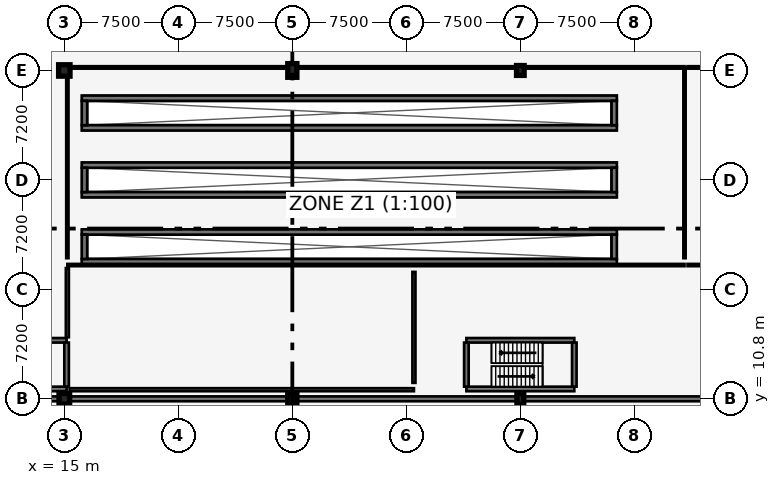
"""IFC4 building model, lengths in metres.
Left out: names, types, materials, properties, quantities, classifications, styles, units other than length and angle.
Written with IfcOpenShell. Run it as: python <this file> out.ifc"""

import sys

from ifc_helpers import new_model, si_unit, direction, frame, frame_2d, origin, origin_2d, place, context, subcontext, project, spatial, rectangle, extrude, element, fill, save


model = new_model("IFC4")
c1 = context("Model", 3, precision=1e-05, world=origin(), true_north=direction((0.0, 1.0)))
c2 = subcontext(c1, "Body", "Model", "MODEL_VIEW")
j1 = project(units=[si_unit("LENGTHUNIT", "METRE"), si_unit("PLANEANGLEUNIT", "RADIAN")], contexts=[c1])
p1 = place(None, origin())
s1 = spatial("IfcSite", under=j1, at=p1, CompositionType="ELEMENT")
p2 = place(p1, origin())
s2 = spatial("IfcBuilding", under=s1, at=p2, CompositionType="ELEMENT")
p3 = place(p2, origin())
s3 = spatial("IfcBuildingStorey", under=s2, at=p3, CompositionType="ELEMENT", Elevation=0.0)
for number, where, z_axis, x_axis in (
    (1, (16.15, 19.825, -1.65), (0.0, 0.0, 1.0), (1.0, 0.0, 0.0)),
    (2, (16.15, 21.775, -1.65), (0.0, 0.0, 1.0), (1.0, 0.0, 0.0)),
):
    element("IfcWall", number, at=place(p3, frame(where, z_axis=z_axis, x_axis=x_axis)), inside=s3, PredefinedType="USERDEFINED", context=c2, shape_type="SweptSolid", body=[
        extrude(rectangle(XDim=35.2, YDim=0.35, at=frame_2d((17.6, 0.0))), origin(), (0.0, 0.0, 1.0), 1.225),
    ])
for number, where, z_axis, x_axis in (
    (3, (16.325, 20.0, -1.65), (0.0, 0.0, 1.0), (0.0, 1.0, 0.0)),
    (4, (51.175, 20.0, -1.65), (0.0, 0.0, 1.0), (0.0, 1.0, 0.0)),
):
    element("IfcWall", number, at=place(p3, frame(where, z_axis=z_axis, x_axis=x_axis)), inside=s3, PredefinedType="USERDEFINED", context=c2, shape_type="SweptSolid", body=[
        extrude(rectangle(XDim=1.6, YDim=0.35, at=frame_2d((0.8, 0.0))), origin(), (0.0, 0.0, 1.0), 1.225),
    ])
for number, where, z_axis, x_axis in (
    (5, (16.15, 24.225, -1.65), (0.0, 0.0, 1.0), (1.0, 0.0, 0.0)),
    (6, (16.15, 26.175, -1.65), (0.0, 0.0, 1.0), (1.0, 0.0, 0.0)),
):
    element("IfcWall", number, at=place(p3, frame(where, z_axis=z_axis, x_axis=x_axis)), inside=s3, PredefinedType="USERDEFINED", context=c2, shape_type="SweptSolid", body=[
        extrude(rectangle(XDim=35.2, YDim=0.35, at=frame_2d((17.6, 0.0))), origin(), (0.0, 0.0, 1.0), 1.225),
    ])
for number, where, z_axis, x_axis in (
    (7, (16.325, 24.4, -1.65), (0.0, 0.0, 1.0), (0.0, 1.0, 0.0)),
    (8, (51.175, 24.4, -1.65), (0.0, 0.0, 1.0), (0.0, 1.0, 0.0)),
):
    element("IfcWall", number, at=place(p3, frame(where, z_axis=z_axis, x_axis=x_axis)), inside=s3, PredefinedType="USERDEFINED", context=c2, shape_type="SweptSolid", body=[
        extrude(rectangle(XDim=1.6, YDim=0.35, at=frame_2d((0.8, 0.0))), origin(), (0.0, 0.0, 1.0), 1.225),
    ])
for number, where, z_axis, x_axis in (
    (9, (16.15, 28.625, -1.65), (0.0, 0.0, 1.0), (1.0, 0.0, 0.0)),
    (10, (16.15, 30.575, -1.65), (0.0, 0.0, 1.0), (1.0, 0.0, 0.0)),
):
    element("IfcWall", number, at=place(p3, frame(where, z_axis=z_axis, x_axis=x_axis)), inside=s3, PredefinedType="USERDEFINED", context=c2, shape_type="SweptSolid", body=[
        extrude(rectangle(XDim=35.2, YDim=0.35, at=frame_2d((17.6, 0.0))), origin(), (0.0, 0.0, 1.0), 1.225),
    ])
for number, where, z_axis, x_axis in (
    (11, (16.325, 28.8, -1.65), (0.0, 0.0, 1.0), (0.0, 1.0, 0.0)),
    (12, (51.175, 28.8, -1.65), (0.0, 0.0, 1.0), (0.0, 1.0, 0.0)),
):
    element("IfcWall", number, at=place(p3, frame(where, z_axis=z_axis, x_axis=x_axis)), inside=s3, PredefinedType="USERDEFINED", context=c2, shape_type="SweptSolid", body=[
        extrude(rectangle(XDim=1.6, YDim=0.35, at=frame_2d((0.8, 0.0))), origin(), (0.0, 0.0, 1.0), 1.225),
    ])
p4 = place(p3, frame((15.0, 10.8, 0.0), z_axis=(0.0, 0.0, 1.0), x_axis=(1.0, 0.0, 0.0)))
e13 = element("IfcColumn", 13, at=p4, inside=s3, PredefinedType="COLUMN", context=c2, shape_type="SweptSolid", body=[
    extrude(rectangle(XDim=0.7, YDim=0.7, at=origin_2d()), origin(), (0.0, 0.0, 1.0), 4.8),
])
p5 = place(p3, frame((15.0, 32.4, 0.0), z_axis=(0.0, 0.0, 1.0), x_axis=(1.0, 0.0, 0.0)))
e14 = element("IfcColumn", 14, at=p5, inside=s3, PredefinedType="COLUMN", context=c2, shape_type="SweptSolid", body=[
    extrude(rectangle(XDim=0.75, YDim=0.75, at=origin_2d()), origin(), (0.0, 0.0, 1.0), 4.8),
])
p6 = place(p3, frame((30.0, 10.8, 0.0), z_axis=(0.0, 0.0, 1.0), x_axis=(1.0, 0.0, 0.0)))
e15 = element("IfcColumn", 15, at=p6, inside=s3, PredefinedType="COLUMN", context=c2, shape_type="SweptSolid", body=[
    extrude(rectangle(XDim=0.6, YDim=0.8, at=origin_2d()), origin(), (0.0, 0.0, 1.0), 4.8),
])
p7 = place(p3, frame((30.0, 32.4, 0.0), z_axis=(0.0, 0.0, 1.0), x_axis=(1.0, 0.0, 0.0)))
e16 = element("IfcColumn", 16, at=p7, inside=s3, PredefinedType="COLUMN", context=c2, shape_type="SweptSolid", body=[
    extrude(rectangle(XDim=0.6, YDim=0.9, at=origin_2d()), origin(), (0.0, 0.0, 1.0), 4.8),
])
p8 = place(p3, frame((45.0, 10.8, 0.0), z_axis=(0.0, 0.0, 1.0), x_axis=(1.0, 0.0, 0.0)))
e17 = element("IfcColumn", 17, at=p8, inside=s3, PredefinedType="COLUMN", context=c2, shape_type="SweptSolid", body=[
    extrude(rectangle(XDim=0.45, YDim=0.7, at=origin_2d()), origin(), (0.0, 0.0, 1.0), 4.8),
])
p9 = place(p3, frame((45.0, 32.4, 0.0), z_axis=(0.0, 0.0, 1.0), x_axis=(1.0, 0.0, 0.0)))
e18 = element("IfcColumn", 18, at=p9, inside=s3, PredefinedType="COLUMN", context=c2, shape_type="SweptSolid", body=[
    extrude(rectangle(XDim=0.5, YDim=0.65, at=origin_2d()), origin(), (0.0, 0.0, 1.0), 4.8),
])
p10 = place(p3, frame((0.0, 10.8, 0.0), z_axis=(0.0, 0.0, 1.0), x_axis=(1.0, 0.0, 0.0)))
e19 = element("IfcWall", 19, at=p10, inside=s3, PredefinedType="SOLIDWALL", context=c2, shape_type="SweptSolid", body=[
    extrude(rectangle(XDim=93.6, YDim=0.32, at=frame_2d((46.8, 0.0))), origin(), (0.0, 0.0, 1.0), 4.25),
])
p11 = place(p10, frame((2.2, 0.0, 0.72)))
e20 = element("IfcOpeningElement", 20, at=p11, cuts=e19, PredefinedType="OPENING", context=c2, shape_type="SweptSolid", body=[
    extrude(rectangle(XDim=1.35, YDim=2.05, at=frame_2d((0.675, 1.025))), frame((0.0, 0.17, 0.0), z_axis=(0.0, -1.0, 0.0), x_axis=(1.0, 0.0, 0.0)), (0.0, 0.0, 1.0), 0.34),
])
p12 = place(p10, frame((9.4, 0.0, 0.72)))
e21 = element("IfcOpeningElement", 21, at=p12, cuts=e19, PredefinedType="OPENING", context=c2, shape_type="SweptSolid", body=[
    extrude(rectangle(XDim=1.5, YDim=2.1, at=frame_2d((0.75, 1.05))), frame((0.0, 0.17, 0.0), z_axis=(0.0, -1.0, 0.0), x_axis=(1.0, 0.0, 0.0)), (0.0, 0.0, 1.0), 0.34),
])
p13 = place(p10, frame((16.6, 0.0, 0.72)))
e22 = element("IfcOpeningElement", 22, at=p13, cuts=e19, PredefinedType="OPENING", context=c2, shape_type="SweptSolid", body=[
    extrude(rectangle(XDim=1.65, YDim=2.1, at=frame_2d((0.825, 1.05))), frame((0.0, 0.17, 0.0), z_axis=(0.0, -1.0, 0.0), x_axis=(1.0, 0.0, 0.0)), (0.0, 0.0, 1.0), 0.34),
])
p14 = place(p10, frame((23.8, 0.0, 0.72)))
e23 = element("IfcOpeningElement", 23, at=p14, cuts=e19, PredefinedType="OPENING", context=c2, shape_type="SweptSolid", body=[
    extrude(rectangle(XDim=1.8, YDim=2.15, at=frame_2d((0.9, 1.075))), frame((0.0, 0.17, 0.0), z_axis=(0.0, -1.0, 0.0), x_axis=(1.0, 0.0, 0.0)), (0.0, 0.0, 1.0), 0.34),
])
p15 = place(p10, frame((31.0, 0.0, 0.72)))
e24 = element("IfcOpeningElement", 24, at=p15, cuts=e19, PredefinedType="OPENING", context=c2, shape_type="SweptSolid", body=[
    extrude(rectangle(XDim=1.2, YDim=2.0, at=frame_2d((0.6, 1.0))), frame((0.0, 0.17, 0.0), z_axis=(0.0, -1.0, 0.0), x_axis=(1.0, 0.0, 0.0)), (0.0, 0.0, 1.0), 0.34),
])
p16 = place(p10, frame((38.2, 0.0, 0.72)))
e25 = element("IfcOpeningElement", 25, at=p16, cuts=e19, PredefinedType="OPENING", context=c2, shape_type="SweptSolid", body=[
    extrude(rectangle(XDim=1.35, YDim=2.05, at=frame_2d((0.675, 1.025))), frame((0.0, 0.17, 0.0), z_axis=(0.0, -1.0, 0.0), x_axis=(1.0, 0.0, 0.0)), (0.0, 0.0, 1.0), 0.34),
])
p17 = place(p10, frame((52.6, 0.0, 0.72)))
e26 = element("IfcOpeningElement", 26, at=p17, cuts=e19, PredefinedType="OPENING", context=c2, shape_type="SweptSolid", body=[
    extrude(rectangle(XDim=1.65, YDim=2.1, at=frame_2d((0.825, 1.05))), frame((0.0, 0.17, 0.0), z_axis=(0.0, -1.0, 0.0), x_axis=(1.0, 0.0, 0.0)), (0.0, 0.0, 1.0), 0.34),
])
p18 = place(p10, frame((67.0, 0.0, 0.72)))
e27 = element("IfcOpeningElement", 27, at=p18, cuts=e19, PredefinedType="OPENING", context=c2, shape_type="SweptSolid", body=[
    extrude(rectangle(XDim=1.2, YDim=2.0, at=frame_2d((0.6, 1.0))), frame((0.0, 0.17, 0.0), z_axis=(0.0, -1.0, 0.0), x_axis=(1.0, 0.0, 0.0)), (0.0, 0.0, 1.0), 0.34),
])
p19 = place(p10, frame((81.4, 0.0, 0.72)))
e28 = element("IfcOpeningElement", 28, at=p19, cuts=e19, PredefinedType="OPENING", context=c2, shape_type="SweptSolid", body=[
    extrude(rectangle(XDim=1.5, YDim=2.1, at=frame_2d((0.75, 1.05))), frame((0.0, 0.17, 0.0), z_axis=(0.0, -1.0, 0.0), x_axis=(1.0, 0.0, 0.0)), (0.0, 0.0, 1.0), 0.34),
])
p20 = place(p10, frame((6.2, 0.0, 0.0)))
e29 = element("IfcOpeningElement", 29, at=p20, cuts=e19, PredefinedType="OPENING", context=c2, shape_type="SweptSolid", body=[
    extrude(rectangle(XDim=2.0, YDim=2.35, at=frame_2d((1.0, 1.175))), frame((0.0, 0.17, 0.0), z_axis=(0.0, -1.0, 0.0), x_axis=(1.0, 0.0, 0.0)), (0.0, 0.0, 1.0), 0.34),
])
p21 = place(p10, frame((20.6, 0.0, 0.0)))
e30 = element("IfcOpeningElement", 30, at=p21, cuts=e19, PredefinedType="OPENING", context=c2, shape_type="SweptSolid", body=[
    extrude(rectangle(XDim=1.05, YDim=2.1, at=frame_2d((0.525, 1.05))), frame((0.0, 0.17, 0.0), z_axis=(0.0, -1.0, 0.0), x_axis=(1.0, 0.0, 0.0)), (0.0, 0.0, 1.0), 0.34),
])
p22 = place(p10, frame((35.0, 0.0, 0.0)))
e31 = element("IfcOpeningElement", 31, at=p22, cuts=e19, PredefinedType="OPENING", context=c2, shape_type="SweptSolid", body=[
    extrude(rectangle(XDim=2.0, YDim=2.35, at=frame_2d((1.0, 1.175))), frame((0.0, 0.17, 0.0), z_axis=(0.0, -1.0, 0.0), x_axis=(1.0, 0.0, 0.0)), (0.0, 0.0, 1.0), 0.34),
])
p23 = place(p10, frame((49.4, 0.0, 0.0)))
e32 = element("IfcOpeningElement", 32, at=p23, cuts=e19, PredefinedType="OPENING", context=c2, shape_type="SweptSolid", body=[
    extrude(rectangle(XDim=2.0, YDim=2.35, at=frame_2d((1.0, 1.175))), frame((0.0, 0.17, 0.0), z_axis=(0.0, -1.0, 0.0), x_axis=(1.0, 0.0, 0.0)), (0.0, 0.0, 1.0), 0.34),
])
p24 = place(p10, frame((63.8, 0.0, 0.0)))
e33 = element("IfcOpeningElement", 33, at=p24, cuts=e19, PredefinedType="OPENING", context=c2, shape_type="SweptSolid", body=[
    extrude(rectangle(XDim=1.1, YDim=2.1, at=frame_2d((0.55, 1.05))), frame((0.0, 0.17, 0.0), z_axis=(0.0, -1.0, 0.0), x_axis=(1.0, 0.0, 0.0)), (0.0, 0.0, 1.0), 0.34),
])
for number, where, z_axis, x_axis in (
    (34, (8.05, 11.45, 0.0), (0.0, 0.0, 1.0), (1.0, 0.0, 0.0)),
    (35, (15.15, 14.65, 0.0), (0.0, 0.0, 1.0), (-1.0, 0.0, 0.0)),
):
    element("IfcWall", number, at=place(p3, frame(where, z_axis=z_axis, x_axis=x_axis)), inside=s3, PredefinedType="SHEAR", context=c2, shape_type="SweptSolid", body=[
        extrude(rectangle(XDim=7.1, YDim=0.3, at=frame_2d((3.55, 0.0))), origin(), (0.0, 0.0, 1.0), 4.5),
    ])
p25 = place(p3, frame((15.15, 11.6, 0.0), z_axis=(0.0, 0.0, 1.0), x_axis=(0.0, 1.0, 0.0)))
e36 = element("IfcWall", 36, at=p25, inside=s3, PredefinedType="SHEAR", context=c2, shape_type="SweptSolid", body=[
    extrude(rectangle(XDim=2.9, YDim=0.3, at=frame_2d((1.45, 0.0))), origin(), (0.0, 0.0, 1.0), 4.5),
])
for number, where, z_axis, x_axis in (
    (37, (41.45, 11.45, 0.0), (0.0, 0.0, 1.0), (1.0, 0.0, 0.0)),
    (38, (48.55, 14.65, 0.0), (0.0, 0.0, 1.0), (-1.0, 0.0, 0.0)),
):
    element("IfcWall", number, at=place(p3, frame(where, z_axis=z_axis, x_axis=x_axis)), inside=s3, PredefinedType="SHEAR", context=c2, shape_type="SweptSolid", body=[
        extrude(rectangle(XDim=7.1, YDim=0.3, at=frame_2d((3.55, 0.0))), origin(), (0.0, 0.0, 1.0), 4.5),
    ])
p26 = place(p3, frame((48.55, 11.6, 0.0), z_axis=(0.0, 0.0, 1.0), x_axis=(0.0, 1.0, 0.0)))
e39 = element("IfcWall", 39, at=p26, inside=s3, PredefinedType="SHEAR", context=c2, shape_type="SweptSolid", body=[
    extrude(rectangle(XDim=2.9, YDim=0.3, at=frame_2d((1.45, 0.0))), origin(), (0.0, 0.0, 1.0), 4.5),
])
p27 = place(p3, frame((41.45, 14.5, 0.0), z_axis=(0.0, 0.0, 1.0), x_axis=(0.0, -1.0, 0.0)))
e40 = element("IfcWall", 40, at=p27, inside=s3, PredefinedType="SHEAR", context=c2, shape_type="SweptSolid", body=[
    extrude(rectangle(XDim=2.9, YDim=0.3, at=frame_2d((1.45, 0.0))), origin(), (0.0, 0.0, 1.0), 4.5),
])
p28 = place(p27, frame((0.75, 0.0, 0.0)))
e41 = element("IfcOpeningElement", 41, at=p28, cuts=e40, PredefinedType="OPENING", context=c2, shape_type="SweptSolid", body=[
    extrude(rectangle(XDim=1.07, YDim=2.15, at=frame_2d((0.535, 1.075))), frame((0.0, 0.16, 0.0), z_axis=(0.0, -1.0, 0.0), x_axis=(1.0, 0.0, 0.0)), (0.0, 0.0, 1.0), 0.32),
])
p29 = place(p3, frame((55.8, 19.6, 0.0), z_axis=(0.0, 0.0, 1.0), x_axis=(-1.0, 0.0, 0.0)))
e42 = element("IfcWall", 42, at=p29, inside=s3, PredefinedType="PARTITIONING", context=c2, shape_type="SweptSolid", body=[
    extrude(rectangle(XDim=40.6, YDim=0.15, at=frame_2d((20.3, 0.0))), origin(), (0.0, 0.0, 1.0), 3.682),
])
p30 = place(p3, frame((55.8, 20.05, 0.0), z_axis=(0.0, 0.0, 1.0), x_axis=(0.0, 1.0, 0.0)))
e43 = element("IfcWall", 43, at=p30, inside=s3, PredefinedType="PARTITIONING", context=c2, shape_type="SweptSolid", body=[
    extrude(rectangle(XDim=12.55, YDim=0.15, at=frame_2d((6.275, 0.0))), origin(), (0.0, 0.0, 1.0), 3.87),
])
p31 = place(p3, frame((15.2, 32.6, 0.0), z_axis=(0.0, 0.0, 1.0), x_axis=(0.0, -1.0, 0.0)))
e44 = element("IfcWall", 44, at=p31, inside=s3, PredefinedType="PARTITIONING", context=c2, shape_type="SweptSolid", body=[
    extrude(rectangle(XDim=12.55, YDim=0.15, at=frame_2d((6.275, 0.0))), origin(), (0.0, 0.0, 1.0), 4.1),
])
p32 = place(p3, frame((15.2, 32.6, 0.0), z_axis=(0.0, 0.0, 1.0), x_axis=(1.0, 0.0, 0.0)))
e45 = element("IfcWall", 45, at=p32, inside=s3, PredefinedType="PARTITIONING", context=c2, shape_type="SweptSolid", body=[
    extrude(rectangle(XDim=40.6, YDim=0.16, at=frame_2d((20.3, 0.0))), origin(), (0.0, 0.0, 1.0), 3.87),
])
p33 = place(p32, frame((19.3, 0.0, 0.0)))
e46 = element("IfcOpeningElement", 46, at=p33, cuts=e45, PredefinedType="OPENING", context=c2, shape_type="SweptSolid", body=[
    extrude(rectangle(XDim=2.0, YDim=2.3, at=frame_2d((1.0, 1.15))), frame((0.0, 0.09, 0.0), z_axis=(0.0, -1.0, 0.0), x_axis=(1.0, 0.0, 0.0)), (0.0, 0.0, 1.0), 0.18),
])
p34 = place(p32, frame((35.4, 0.0, 0.0)))
e47 = element("IfcOpeningElement", 47, at=p34, cuts=e45, PredefinedType="OPENING", context=c2, shape_type="SweptSolid", body=[
    extrude(rectangle(XDim=2.0, YDim=2.3, at=frame_2d((1.0, 1.15))), frame((0.0, 0.09, 0.0), z_axis=(0.0, -1.0, 0.0), x_axis=(1.0, 0.0, 0.0)), (0.0, 0.0, 1.0), 0.18),
])
p35 = place(p3, frame((92.4, 19.6, 0.0), z_axis=(0.0, 0.0, 1.0), x_axis=(-1.0, 0.0, 0.0)))
e48 = element("IfcWall", 48, at=p35, inside=s3, PredefinedType="PARTITIONING", context=c2, shape_type="SweptSolid", body=[
    extrude(rectangle(XDim=36.4, YDim=0.15, at=frame_2d((18.2, 0.0))), origin(), (0.0, 0.0, 1.0), 3.682),
])
p36 = place(p3, frame((56.0, 32.6, 0.0), z_axis=(0.0, 0.0, 1.0), x_axis=(1.0, 0.0, 0.0)))
e49 = element("IfcWall", 49, at=p36, inside=s3, PredefinedType="PARTITIONING", context=c2, shape_type="SweptSolid", body=[
    extrude(rectangle(XDim=36.4, YDim=0.16, at=frame_2d((18.2, 0.0))), origin(), (0.0, 0.0, 1.0), 3.782),
])
p37 = place(p36, frame((10.32, 0.0, 0.0)))
e50 = element("IfcOpeningElement", 50, at=p37, cuts=e49, PredefinedType="OPENING", context=c2, shape_type="SweptSolid", body=[
    extrude(rectangle(XDim=2.0, YDim=2.3, at=frame_2d((1.0, 1.15))), frame((0.0, 0.09, 0.0), z_axis=(0.0, -1.0, 0.0), x_axis=(1.0, 0.0, 0.0)), (0.0, 0.0, 1.0), 0.18),
])
p38 = place(p36, frame((31.2, 0.0, 0.0)))
e51 = element("IfcOpeningElement", 51, at=p38, cuts=e49, PredefinedType="OPENING", context=c2, shape_type="SweptSolid", body=[
    extrude(rectangle(XDim=2.0, YDim=2.3, at=frame_2d((1.0, 1.15))), frame((0.0, 0.09, 0.0), z_axis=(0.0, -1.0, 0.0), x_axis=(1.0, 0.0, 0.0)), (0.0, 0.0, 1.0), 0.18),
])
p39 = place(p3, frame((38.0, 11.4, 0.0), z_axis=(0.0, 0.0, 1.0), x_axis=(-1.0, 0.0, 0.0)))
e52 = element("IfcWall", 52, at=p39, inside=s3, PredefinedType="SOLIDWALL", context=c2, shape_type="SweptSolid", body=[
    extrude(rectangle(XDim=22.65, YDim=0.2, at=frame_2d((11.325, 0.0))), origin(), (0.0, 0.0, 1.0), 3.682),
])
p40 = place(p3, frame((38.0, 11.85, 0.0), z_axis=(0.0, 0.0, 1.0), x_axis=(0.0, 1.0, 0.0)))
e53 = element("IfcWall", 53, at=p40, inside=s3, PredefinedType="SOLIDWALL", context=c2, shape_type="SweptSolid", body=[
    extrude(rectangle(XDim=7.3, YDim=0.2, at=frame_2d((3.65, 0.0))), origin(), (0.0, 0.0, 1.0), 4.1),
])
p41 = place(p3, frame((15.2, 19.4, 0.0), z_axis=(0.0, 0.0, 1.0), x_axis=(0.0, -1.0, 0.0)))
e54 = element("IfcWall", 54, at=p41, inside=s3, PredefinedType="SOLIDWALL", context=c2, shape_type="SweptSolid", body=[
    extrude(rectangle(XDim=4.55, YDim=0.2, at=frame_2d((2.275, 0.0))), origin(), (0.0, 0.0, 1.0), 4.1),
])
p42 = place(p41, frame((1.375, 0.0, 0.0)))
e55 = element("IfcOpeningElement", 55, at=p42, cuts=e54, PredefinedType="OPENING", context=c2, shape_type="SweptSolid", body=[
    extrude(rectangle(XDim=1.8, YDim=2.2, at=frame_2d((0.9, 1.1))), frame((0.0, 0.11, 0.0), z_axis=(0.0, -1.0, 0.0), x_axis=(1.0, 0.0, 0.0)), (0.0, 0.0, 1.0), 0.22),
])
p43 = place(p13, origin())
e56 = element("IfcWindow", 56, at=p43, inside=s3, PartitioningType="SINGLE_PANEL", PredefinedType="WINDOW", context=c2, shape_type="SweptSolid", body=[
    extrude(rectangle(XDim=1.65, YDim=2.1, at=frame_2d((0.825, 1.05))), frame((0.0, 0.03, 0.0), z_axis=(0.0, -1.0, 0.0), x_axis=(1.0, 0.0, 0.0)), (0.0, 0.0, 1.0), 0.06),
])
fill(e22, e56)
p44 = place(p14, origin())
e57 = element("IfcWindow", 57, at=p44, inside=s3, PartitioningType="SINGLE_PANEL", PredefinedType="WINDOW", context=c2, shape_type="SweptSolid", body=[
    extrude(rectangle(XDim=1.8, YDim=2.15, at=frame_2d((0.9, 1.075))), frame((0.0, 0.03, 0.0), z_axis=(0.0, -1.0, 0.0), x_axis=(1.0, 0.0, 0.0)), (0.0, 0.0, 1.0), 0.06),
])
fill(e23, e57)
p45 = place(p15, origin())
e58 = element("IfcWindow", 58, at=p45, inside=s3, PartitioningType="SINGLE_PANEL", PredefinedType="WINDOW", context=c2, shape_type="SweptSolid", body=[
    extrude(rectangle(XDim=1.2, YDim=2.0, at=frame_2d((0.6, 1.0))), frame((0.0, 0.03, 0.0), z_axis=(0.0, -1.0, 0.0), x_axis=(1.0, 0.0, 0.0)), (0.0, 0.0, 1.0), 0.06),
])
fill(e24, e58)
p46 = place(p16, origin())
e59 = element("IfcWindow", 59, at=p46, inside=s3, PartitioningType="SINGLE_PANEL", PredefinedType="WINDOW", context=c2, shape_type="SweptSolid", body=[
    extrude(rectangle(XDim=1.35, YDim=2.05, at=frame_2d((0.675, 1.025))), frame((0.0, 0.03, 0.0), z_axis=(0.0, -1.0, 0.0), x_axis=(1.0, 0.0, 0.0)), (0.0, 0.0, 1.0), 0.06),
])
fill(e25, e59)
p47 = place(p17, origin())
e60 = element("IfcWindow", 60, at=p47, inside=s3, PartitioningType="SINGLE_PANEL", PredefinedType="WINDOW", context=c2, shape_type="SweptSolid", body=[
    extrude(rectangle(XDim=1.65, YDim=2.1, at=frame_2d((0.825, 1.05))), frame((0.0, 0.03, 0.0), z_axis=(0.0, -1.0, 0.0), x_axis=(1.0, 0.0, 0.0)), (0.0, 0.0, 1.0), 0.06),
])
fill(e26, e60)
p48 = place(p21, frame((1.05, 0.0, 0.0), z_axis=(0.0, 0.0, 1.0), x_axis=(-1.0, 0.0, 0.0)))
e61 = element("IfcDoor", 61, at=p48, inside=s3, OperationType="SINGLE_SWING_RIGHT", PredefinedType="DOOR", context=c2, shape_type="SweptSolid", body=[
    extrude(rectangle(XDim=1.05, YDim=2.1, at=frame_2d((0.525, 1.05))), frame((0.0, 0.025, 0.0), z_axis=(0.0, -1.0, 0.0), x_axis=(1.0, 0.0, 0.0)), (0.0, 0.0, 1.0), 0.05),
])
fill(e30, e61)
p49 = place(p22, frame((2.0, 0.0, 0.0), z_axis=(0.0, 0.0, 1.0), x_axis=(-1.0, 0.0, 0.0)))
e62 = element("IfcDoor", 62, at=p49, inside=s3, OperationType="DOUBLE_SWING_LEFT", PredefinedType="DOOR", context=c2, shape_type="SweptSolid", body=[
    extrude(rectangle(XDim=2.0, YDim=2.35, at=frame_2d((1.0, 1.175))), frame((0.0, 0.025, 0.0), z_axis=(0.0, -1.0, 0.0), x_axis=(1.0, 0.0, 0.0)), (0.0, 0.0, 1.0), 0.05),
])
fill(e31, e62)
p50 = place(p23, frame((2.0, 0.0, 0.0), z_axis=(0.0, 0.0, 1.0), x_axis=(-1.0, 0.0, 0.0)))
e63 = element("IfcDoor", 63, at=p50, inside=s3, OperationType="DOUBLE_SWING_LEFT", PredefinedType="DOOR", context=c2, shape_type="SweptSolid", body=[
    extrude(rectangle(XDim=2.0, YDim=2.35, at=frame_2d((1.0, 1.175))), frame((0.0, 0.025, 0.0), z_axis=(0.0, -1.0, 0.0), x_axis=(1.0, 0.0, 0.0)), (0.0, 0.0, 1.0), 0.05),
])
fill(e32, e63)
p51 = place(p28, frame((1.07, 0.0, 0.0), z_axis=(0.0, 0.0, 1.0), x_axis=(-1.0, 0.0, 0.0)))
e64 = element("IfcDoor", 64, at=p51, inside=s3, OperationType="SINGLE_SWING_RIGHT", PredefinedType="DOOR", context=c2, shape_type="SweptSolid", body=[
    extrude(rectangle(XDim=1.07, YDim=2.15, at=frame_2d((0.535, 1.075))), frame((0.0, 0.025, 0.0), z_axis=(0.0, -1.0, 0.0), x_axis=(1.0, 0.0, 0.0)), (0.0, 0.0, 1.0), 0.05),
])
fill(e41, e64)
p52 = place(p33, origin())
e65 = element("IfcDoor", 65, at=p52, inside=s3, OperationType="DOUBLE_SWING_LEFT", PredefinedType="DOOR", context=c2, shape_type="SweptSolid", body=[
    extrude(rectangle(XDim=2.0, YDim=2.3, at=frame_2d((1.0, 1.15))), frame((0.0, 0.025, 0.0), z_axis=(0.0, -1.0, 0.0), x_axis=(1.0, 0.0, 0.0)), (0.0, 0.0, 1.0), 0.05),
])
fill(e46, e65)
p53 = place(p34, origin())
e66 = element("IfcDoor", 66, at=p53, inside=s3, OperationType="DOUBLE_SWING_LEFT", PredefinedType="DOOR", context=c2, shape_type="SweptSolid", body=[
    extrude(rectangle(XDim=2.0, YDim=2.3, at=frame_2d((1.0, 1.15))), frame((0.0, 0.025, 0.0), z_axis=(0.0, -1.0, 0.0), x_axis=(1.0, 0.0, 0.0)), (0.0, 0.0, 1.0), 0.05),
])
fill(e47, e66)
p54 = place(p42, origin())
e67 = element("IfcDoor", 67, at=p54, inside=s3, OperationType="DOUBLE_SWING_LEFT", PredefinedType="DOOR", context=c2, shape_type="SweptSolid", body=[
    extrude(rectangle(XDim=1.8, YDim=2.2, at=frame_2d((0.9, 1.1))), frame((0.0, 0.025, 0.0), z_axis=(0.0, -1.0, 0.0), x_axis=(1.0, 0.0, 0.0)), (0.0, 0.0, 1.0), 0.05),
])
fill(e55, e67)
save(model, sys.argv[1])
